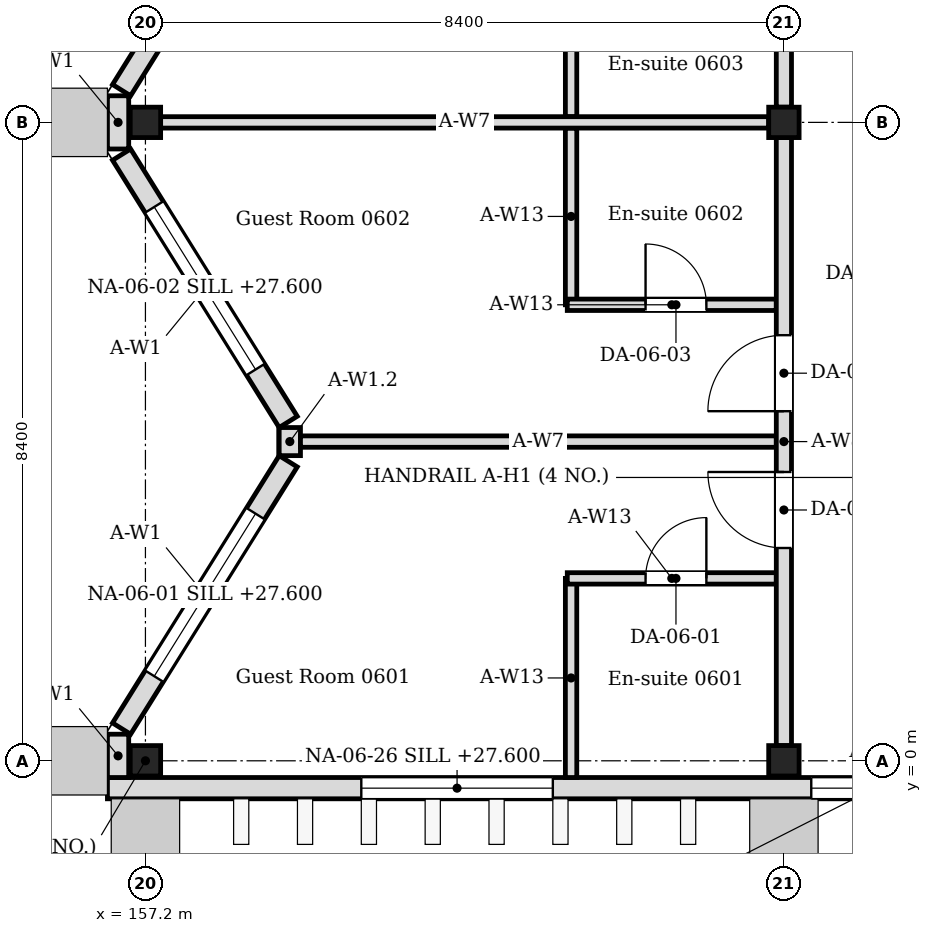
"""IFC4 building model, lengths in metres.
Left out: names, types, materials, properties, quantities, classifications, styles, units other than length and angle.
Written with IfcOpenShell. Run it as: python <this file> out.ifc"""

import sys

from ifc_helpers import new_model, si_unit, direction, frame, frame_2d, origin, origin_2d, place, context, subcontext, project, spatial, rectangle, i_section, extrude, element, fill, save


model = new_model("IFC4")
c1 = context("Model", 3, precision=1e-05, world=origin(), true_north=direction((0.0, 1.0)))
c2 = subcontext(c1, "Body", "Model", "MODEL_VIEW")
j1 = project(units=[si_unit("LENGTHUNIT", "METRE"), si_unit("PLANEANGLEUNIT", "RADIAN")], contexts=[c1])
p1 = place(None, origin())
s1 = spatial("IfcSite", under=j1, at=p1, CompositionType="ELEMENT")
p2 = place(p1, origin())
s2 = spatial("IfcBuilding", under=s1, at=p2, CompositionType="ELEMENT")
p3 = place(p2, frame((0.0, 0.0, 27.0)))
s3 = spatial("IfcBuildingStorey", under=s2, at=p3, CompositionType="ELEMENT", Elevation=27.0)
for number, where, z_axis, x_axis in (
    (1, (157.2, 0.0, 0.0), (0.0, 0.0, 1.0), (1.0, 0.0, 0.0)),
    (2, (157.2, 8.4, 0.0), (0.0, 0.0, 1.0), (1.0, 0.0, 0.0)),
    (3, (165.6, 0.0, 0.0), (0.0, 0.0, 1.0), (1.0, 0.0, 0.0)),
    (4, (165.6, 8.4, 0.0), (0.0, 0.0, 1.0), (1.0, 0.0, 0.0)),
):
    element("IfcColumn", number, at=place(p3, frame(where, z_axis=z_axis, x_axis=x_axis)), inside=s3, PredefinedType="COLUMN", context=c2, shape_type="SweptSolid", body=[
        extrude(i_section(OverallWidth=0.4, OverallDepth=0.4, WebThickness=0.013, FlangeThickness=0.021, FilletRadius=0.022, at=origin_2d()), origin(), (0.0, 0.0, 1.0), 4.2),
    ])
p4 = place(p3, frame((156.84, -0.22, 0.0), z_axis=(0.0, 0.0, 1.0), x_axis=(0.0, 1.0, 0.0)))
e5 = element("IfcWall", 5, at=p4, inside=s3, PredefinedType="SOLIDWALL", context=c2, shape_type="SweptSolid", body=[
    extrude(rectangle(XDim=0.57, YDim=0.28, at=frame_2d((0.285, 0.0))), origin(), (0.0, 0.0, 1.0), 4.05),
])
p5 = place(p3, frame((156.886, 0.424, 0.0), z_axis=(0.0, 0.0, 1.0), x_axis=(0.529018946142, 0.848610013271, 0.0)))
e6 = element("IfcWall", 6, at=p5, inside=s3, PredefinedType="SOLIDWALL", context=c2, shape_type="SweptSolid", body=[
    extrude(rectangle(XDim=4.144, YDim=0.28, at=frame_2d((2.072, 0.0))), origin(), (0.0, 0.0, 1.0), 4.05),
])
p6 = place(p5, frame((0.812, 0.0, 0.6)))
e7 = element("IfcOpeningElement", 7, at=p6, cuts=e6, PredefinedType="OPENING", context=c2, shape_type="SweptSolid", body=[
    extrude(rectangle(XDim=2.52, YDim=2.4, at=frame_2d((1.26, 1.2))), frame((0.0, 0.15, 0.0), z_axis=(0.0, -1.0, 0.0), x_axis=(1.0, 0.0, 0.0)), (0.0, 0.0, 1.0), 0.3),
])
p7 = place(p3, frame((159.079, 4.459, 0.0), z_axis=(0.0, 0.0, 1.0), x_axis=(-0.529018946142, 0.848610013271, 0.0)))
e8 = element("IfcWall", 8, at=p7, inside=s3, PredefinedType="SOLIDWALL", context=c2, shape_type="SweptSolid", body=[
    extrude(rectangle(XDim=4.144, YDim=0.28, at=frame_2d((2.072, 0.0))), origin(), (0.0, 0.0, 1.0), 4.05),
])
p8 = place(p7, frame((0.812, 0.0, 0.6)))
e9 = element("IfcOpeningElement", 9, at=p8, cuts=e8, PredefinedType="OPENING", context=c2, shape_type="SweptSolid", body=[
    extrude(rectangle(XDim=2.52, YDim=2.4, at=frame_2d((1.26, 1.2))), frame((0.0, 0.15, 0.0), z_axis=(0.0, -1.0, 0.0), x_axis=(1.0, 0.0, 0.0)), (0.0, 0.0, 1.0), 0.3),
])
p9 = place(p3, frame((159.1, 4.015, 0.0), z_axis=(0.0, 0.0, 1.0), x_axis=(0.0, 1.0, 0.0)))
e10 = element("IfcWall", 10, at=p9, inside=s3, PredefinedType="SOLIDWALL", context=c2, shape_type="SweptSolid", body=[
    extrude(rectangle(XDim=0.37, YDim=0.28, at=frame_2d((0.185, 0.0))), origin(), (0.0, 0.0, 1.0), 3.604),
])
p10 = place(p3, frame((156.84, 8.05, 0.0), z_axis=(0.0, 0.0, 1.0), x_axis=(0.0, 1.0, 0.0)))
e11 = element("IfcWall", 11, at=p10, inside=s3, PredefinedType="SOLIDWALL", context=c2, shape_type="SweptSolid", body=[
    extrude(rectangle(XDim=0.7, YDim=0.28, at=frame_2d((0.35, 0.0))), origin(), (0.0, 0.0, 1.0), 4.05),
])
p11 = place(p3, frame((156.886, 8.824, 0.0), z_axis=(0.0, 0.0, 1.0), x_axis=(0.529018946142, 0.848610013271, 0.0)))
e12 = element("IfcWall", 12, at=p11, inside=s3, PredefinedType="SOLIDWALL", context=c2, shape_type="SweptSolid", body=[
    extrude(rectangle(XDim=4.144, YDim=0.28, at=frame_2d((2.072, 0.0))), origin(), (0.0, 0.0, 1.0), 4.05),
])
p12 = place(p11, frame((0.812, 0.0, 0.6)))
e13 = element("IfcOpeningElement", 13, at=p12, cuts=e12, PredefinedType="OPENING", context=c2, shape_type="SweptSolid", body=[
    extrude(rectangle(XDim=2.52, YDim=2.4, at=frame_2d((1.26, 1.2))), frame((0.0, 0.15, 0.0), z_axis=(0.0, -1.0, 0.0), x_axis=(1.0, 0.0, 0.0)), (0.0, 0.0, 1.0), 0.3),
])
p13 = place(p3, frame((156.7, -0.36, 0.0), z_axis=(0.0, 0.0, 1.0), x_axis=(1.0, 0.0, 0.0)))
e14 = element("IfcWall", 14, at=p13, inside=s3, PredefinedType="SOLIDWALL", context=c2, shape_type="SweptSolid", body=[
    extrude(rectangle(XDim=20.2, YDim=0.28, at=frame_2d((10.1, 0.0))), origin(), (0.0, 0.0, 1.0), 4.05),
])
p14 = place(p13, frame((9.26, 0.0, 0.6)))
e15 = element("IfcOpeningElement", 15, at=p14, cuts=e14, PredefinedType="OPENING", context=c2, shape_type="SweptSolid", body=[
    extrude(rectangle(XDim=1.68, YDim=2.4, at=frame_2d((0.84, 1.2))), frame((0.0, 0.15, 0.0), z_axis=(0.0, -1.0, 0.0), x_axis=(1.0, 0.0, 0.0)), (0.0, 0.0, 1.0), 0.3),
])
p15 = place(p13, frame((3.34, 0.0, 0.6)))
e16 = element("IfcOpeningElement", 16, at=p15, cuts=e14, PredefinedType="OPENING", context=c2, shape_type="SweptSolid", body=[
    extrude(rectangle(XDim=2.52, YDim=2.4, at=frame_2d((1.26, 1.2))), frame((0.0, 0.15, 0.0), z_axis=(0.0, -1.0, 0.0), x_axis=(1.0, 0.0, 0.0)), (0.0, 0.0, 1.0), 0.3),
])
p16 = place(p3, frame((162.8, -0.22, 0.0), z_axis=(0.0, 0.0, 1.0), x_axis=(0.0, 1.0, 0.0)))
e17 = element("IfcWall", 17, at=p16, inside=s3, PredefinedType="PARTITIONING", context=c2, shape_type="SweptSolid", body=[
    extrude(rectangle(XDim=2.62, YDim=0.15, at=frame_2d((1.31, 0.0))), origin(), (0.0, 0.0, 1.0), 4.05),
])
p17 = place(p3, frame((162.75, 2.4, 0.0), z_axis=(0.0, 0.0, 1.0), x_axis=(1.0, 0.0, 0.0)))
e18 = element("IfcWall", 18, at=p17, inside=s3, PredefinedType="PARTITIONING", context=c2, shape_type="SweptSolid", body=[
    extrude(rectangle(XDim=2.75, YDim=0.15, at=frame_2d((1.375, 0.0))), origin(), (0.0, 0.0, 1.0), 4.05),
])
p18 = place(p17, frame((1.03, 0.0, 0.0)))
e19 = element("IfcOpeningElement", 19, at=p18, cuts=e18, PredefinedType="OPENING", context=c2, shape_type="SweptSolid", body=[
    extrude(rectangle(XDim=0.8, YDim=2.1, at=frame_2d((0.4, 1.05))), frame((0.0, 0.085, 0.0), z_axis=(0.0, -1.0, 0.0), x_axis=(1.0, 0.0, 0.0)), (0.0, 0.0, 1.0), 0.17),
])
p19 = place(p3, frame((162.8, 6.0, 0.0), z_axis=(0.0, 0.0, 1.0), x_axis=(0.0, 1.0, 0.0)))
e20 = element("IfcWall", 20, at=p19, inside=s3, PredefinedType="PARTITIONING", context=c2, shape_type="SweptSolid", body=[
    extrude(rectangle(XDim=2.325, YDim=0.15, at=frame_2d((1.163, 0.0))), origin(), (0.0, 0.0, 1.0), 4.05),
])
p20 = place(p3, frame((162.75, 6.0, 0.0), z_axis=(0.0, 0.0, 1.0), x_axis=(1.0, 0.0, 0.0)))
e21 = element("IfcWall", 21, at=p20, inside=s3, PredefinedType="PARTITIONING", context=c2, shape_type="SweptSolid", body=[
    extrude(rectangle(XDim=2.75, YDim=0.15, at=frame_2d((1.375, 0.0))), origin(), (0.0, 0.0, 1.0), 4.05),
])
p21 = place(p20, frame((1.03, 0.0, 0.0)))
e22 = element("IfcOpeningElement", 22, at=p21, cuts=e21, PredefinedType="OPENING", context=c2, shape_type="SweptSolid", body=[
    extrude(rectangle(XDim=0.8, YDim=2.1, at=frame_2d((0.4, 1.05))), frame((0.0, 0.085, 0.0), z_axis=(0.0, -1.0, 0.0), x_axis=(1.0, 0.0, 0.0)), (0.0, 0.0, 1.0), 0.17),
])
p22 = place(p3, frame((162.8, 8.475, 0.0), z_axis=(0.0, 0.0, 1.0), x_axis=(0.0, 1.0, 0.0)))
e23 = element("IfcWall", 23, at=p22, inside=s3, PredefinedType="PARTITIONING", context=c2, shape_type="SweptSolid", body=[
    extrude(rectangle(XDim=2.325, YDim=0.15, at=frame_2d((1.163, 0.0))), origin(), (0.0, 0.0, 1.0), 4.05),
])
p23 = place(p3, frame((157.4, 8.4, 0.0), z_axis=(0.0, 0.0, 1.0), x_axis=(1.0, 0.0, 0.0)))
e24 = element("IfcWall", 24, at=p23, inside=s3, PredefinedType="PARTITIONING", context=c2, shape_type="SweptSolid", body=[
    extrude(rectangle(XDim=8.0, YDim=0.15, at=frame_2d((4.0, 0.0))), origin(), (0.0, 0.0, 1.0), 3.604),
])
p24 = place(p3, frame((159.24, 4.2, 0.0), z_axis=(0.0, 0.0, 1.0), x_axis=(1.0, 0.0, 0.0)))
e25 = element("IfcWall", 25, at=p24, inside=s3, PredefinedType="PARTITIONING", context=c2, shape_type="SweptSolid", body=[
    extrude(rectangle(XDim=6.26, YDim=0.15, at=frame_2d((3.13, 0.0))), origin(), (0.0, 0.0, 1.0), 3.604),
])
p25 = place(p3, frame((165.6, 0.2, 0.0), z_axis=(0.0, 0.0, 1.0), x_axis=(0.0, 1.0, 0.0)))
e26 = element("IfcWall", 26, at=p25, inside=s3, PredefinedType="PARTITIONING", context=c2, shape_type="SweptSolid", body=[
    extrude(rectangle(XDim=8.0, YDim=0.2, at=frame_2d((4.0, 0.0))), origin(), (0.0, 0.0, 1.0), 3.45),
])
p26 = place(p25, frame((2.6, 0.0, 0.0)))
e27 = element("IfcOpeningElement", 27, at=p26, cuts=e26, PredefinedType="OPENING", context=c2, shape_type="SweptSolid", body=[
    extrude(rectangle(XDim=1.0, YDim=2.4, at=frame_2d((0.5, 1.2))), frame((0.0, 0.11, 0.0), z_axis=(0.0, -1.0, 0.0), x_axis=(1.0, 0.0, 0.0)), (0.0, 0.0, 1.0), 0.22),
])
p27 = place(p25, frame((4.4, 0.0, 0.0)))
e28 = element("IfcOpeningElement", 28, at=p27, cuts=e26, PredefinedType="OPENING", context=c2, shape_type="SweptSolid", body=[
    extrude(rectangle(XDim=1.0, YDim=2.4, at=frame_2d((0.5, 1.2))), frame((0.0, 0.11, 0.0), z_axis=(0.0, -1.0, 0.0), x_axis=(1.0, 0.0, 0.0)), (0.0, 0.0, 1.0), 0.22),
])
p28 = place(p3, frame((165.6, 8.6, 0.0), z_axis=(0.0, 0.0, 1.0), x_axis=(0.0, 1.0, 0.0)))
e29 = element("IfcWall", 29, at=p28, inside=s3, PredefinedType="PARTITIONING", context=c2, shape_type="SweptSolid", body=[
    extrude(rectangle(XDim=8.0, YDim=0.2, at=frame_2d((4.0, 0.0))), origin(), (0.0, 0.0, 1.0), 3.45),
])
p29 = place(p28, frame((2.6, 0.0, 0.0)))
e30 = element("IfcOpeningElement", 30, at=p29, cuts=e29, PredefinedType="OPENING", context=c2, shape_type="SweptSolid", body=[
    extrude(rectangle(XDim=1.0, YDim=2.4, at=frame_2d((0.5, 1.2))), frame((0.0, 0.11, 0.0), z_axis=(0.0, -1.0, 0.0), x_axis=(1.0, 0.0, 0.0)), (0.0, 0.0, 1.0), 0.22),
])
p30 = place(p28, frame((4.4, 0.0, 0.0)))
e31 = element("IfcOpeningElement", 31, at=p30, cuts=e29, PredefinedType="OPENING", context=c2, shape_type="SweptSolid", body=[
    extrude(rectangle(XDim=1.0, YDim=2.4, at=frame_2d((0.5, 1.2))), frame((0.0, 0.11, 0.0), z_axis=(0.0, -1.0, 0.0), x_axis=(1.0, 0.0, 0.0)), (0.0, 0.0, 1.0), 0.22),
])
p31 = place(p6, origin())
e32 = element("IfcWindow", 32, at=p31, inside=s3, PartitioningType="SINGLE_PANEL", PredefinedType="WINDOW", context=c2, shape_type="SweptSolid", body=[
    extrude(rectangle(XDim=2.52, YDim=2.4, at=frame_2d((1.26, 1.2))), frame((0.0, 0.03, 0.0), z_axis=(0.0, -1.0, 0.0), x_axis=(1.0, 0.0, 0.0)), (0.0, 0.0, 1.0), 0.06),
])
fill(e7, e32)
p32 = place(p8, origin())
e33 = element("IfcWindow", 33, at=p32, inside=s3, PartitioningType="SINGLE_PANEL", PredefinedType="WINDOW", context=c2, shape_type="SweptSolid", body=[
    extrude(rectangle(XDim=2.52, YDim=2.4, at=frame_2d((1.26, 1.2))), frame((0.0, 0.03, 0.0), z_axis=(0.0, -1.0, 0.0), x_axis=(1.0, 0.0, 0.0)), (0.0, 0.0, 1.0), 0.06),
])
fill(e9, e33)
p33 = place(p14, origin())
e34 = element("IfcWindow", 34, at=p33, inside=s3, PartitioningType="SINGLE_PANEL", PredefinedType="WINDOW", context=c2, shape_type="SweptSolid", body=[
    extrude(rectangle(XDim=1.68, YDim=2.4, at=frame_2d((0.84, 1.2))), frame((0.0, 0.03, 0.0), z_axis=(0.0, -1.0, 0.0), x_axis=(1.0, 0.0, 0.0)), (0.0, 0.0, 1.0), 0.06),
])
fill(e15, e34)
p34 = place(p15, origin())
e35 = element("IfcWindow", 35, at=p34, inside=s3, PartitioningType="SINGLE_PANEL", PredefinedType="WINDOW", context=c2, shape_type="SweptSolid", body=[
    extrude(rectangle(XDim=2.52, YDim=2.4, at=frame_2d((1.26, 1.2))), frame((0.0, 0.03, 0.0), z_axis=(0.0, -1.0, 0.0), x_axis=(1.0, 0.0, 0.0)), (0.0, 0.0, 1.0), 0.06),
])
fill(e16, e35)
p35 = place(p18, origin())
e36 = element("IfcDoor", 36, at=p35, inside=s3, OperationType="SINGLE_SWING_RIGHT", PredefinedType="DOOR", context=c2, shape_type="SweptSolid", body=[
    extrude(rectangle(XDim=0.8, YDim=2.1, at=frame_2d((0.4, 1.05))), frame((0.0, 0.025, 0.0), z_axis=(0.0, -1.0, 0.0), x_axis=(1.0, 0.0, 0.0)), (0.0, 0.0, 1.0), 0.05),
])
fill(e19, e36)
p36 = place(p26, origin())
e37 = element("IfcDoor", 37, at=p36, inside=s3, OperationType="SINGLE_SWING_RIGHT", PredefinedType="DOOR", context=c2, shape_type="SweptSolid", body=[
    extrude(rectangle(XDim=1.0, YDim=2.4, at=frame_2d((0.5, 1.2))), frame((0.0, 0.025, 0.0), z_axis=(0.0, -1.0, 0.0), x_axis=(1.0, 0.0, 0.0)), (0.0, 0.0, 1.0), 0.05),
])
fill(e27, e37)
p37 = place(p21, origin())
e38 = element("IfcDoor", 38, at=p37, inside=s3, OperationType="SINGLE_SWING_LEFT", PredefinedType="DOOR", context=c2, shape_type="SweptSolid", body=[
    extrude(rectangle(XDim=0.8, YDim=2.1, at=frame_2d((0.4, 1.05))), frame((0.0, 0.025, 0.0), z_axis=(0.0, -1.0, 0.0), x_axis=(1.0, 0.0, 0.0)), (0.0, 0.0, 1.0), 0.05),
])
fill(e22, e38)
p38 = place(p27, origin())
e39 = element("IfcDoor", 39, at=p38, inside=s3, OperationType="SINGLE_SWING_LEFT", PredefinedType="DOOR", context=c2, shape_type="SweptSolid", body=[
    extrude(rectangle(XDim=1.0, YDim=2.4, at=frame_2d((0.5, 1.2))), frame((0.0, 0.025, 0.0), z_axis=(0.0, -1.0, 0.0), x_axis=(1.0, 0.0, 0.0)), (0.0, 0.0, 1.0), 0.05),
])
fill(e28, e39)
save(model, sys.argv[1])
